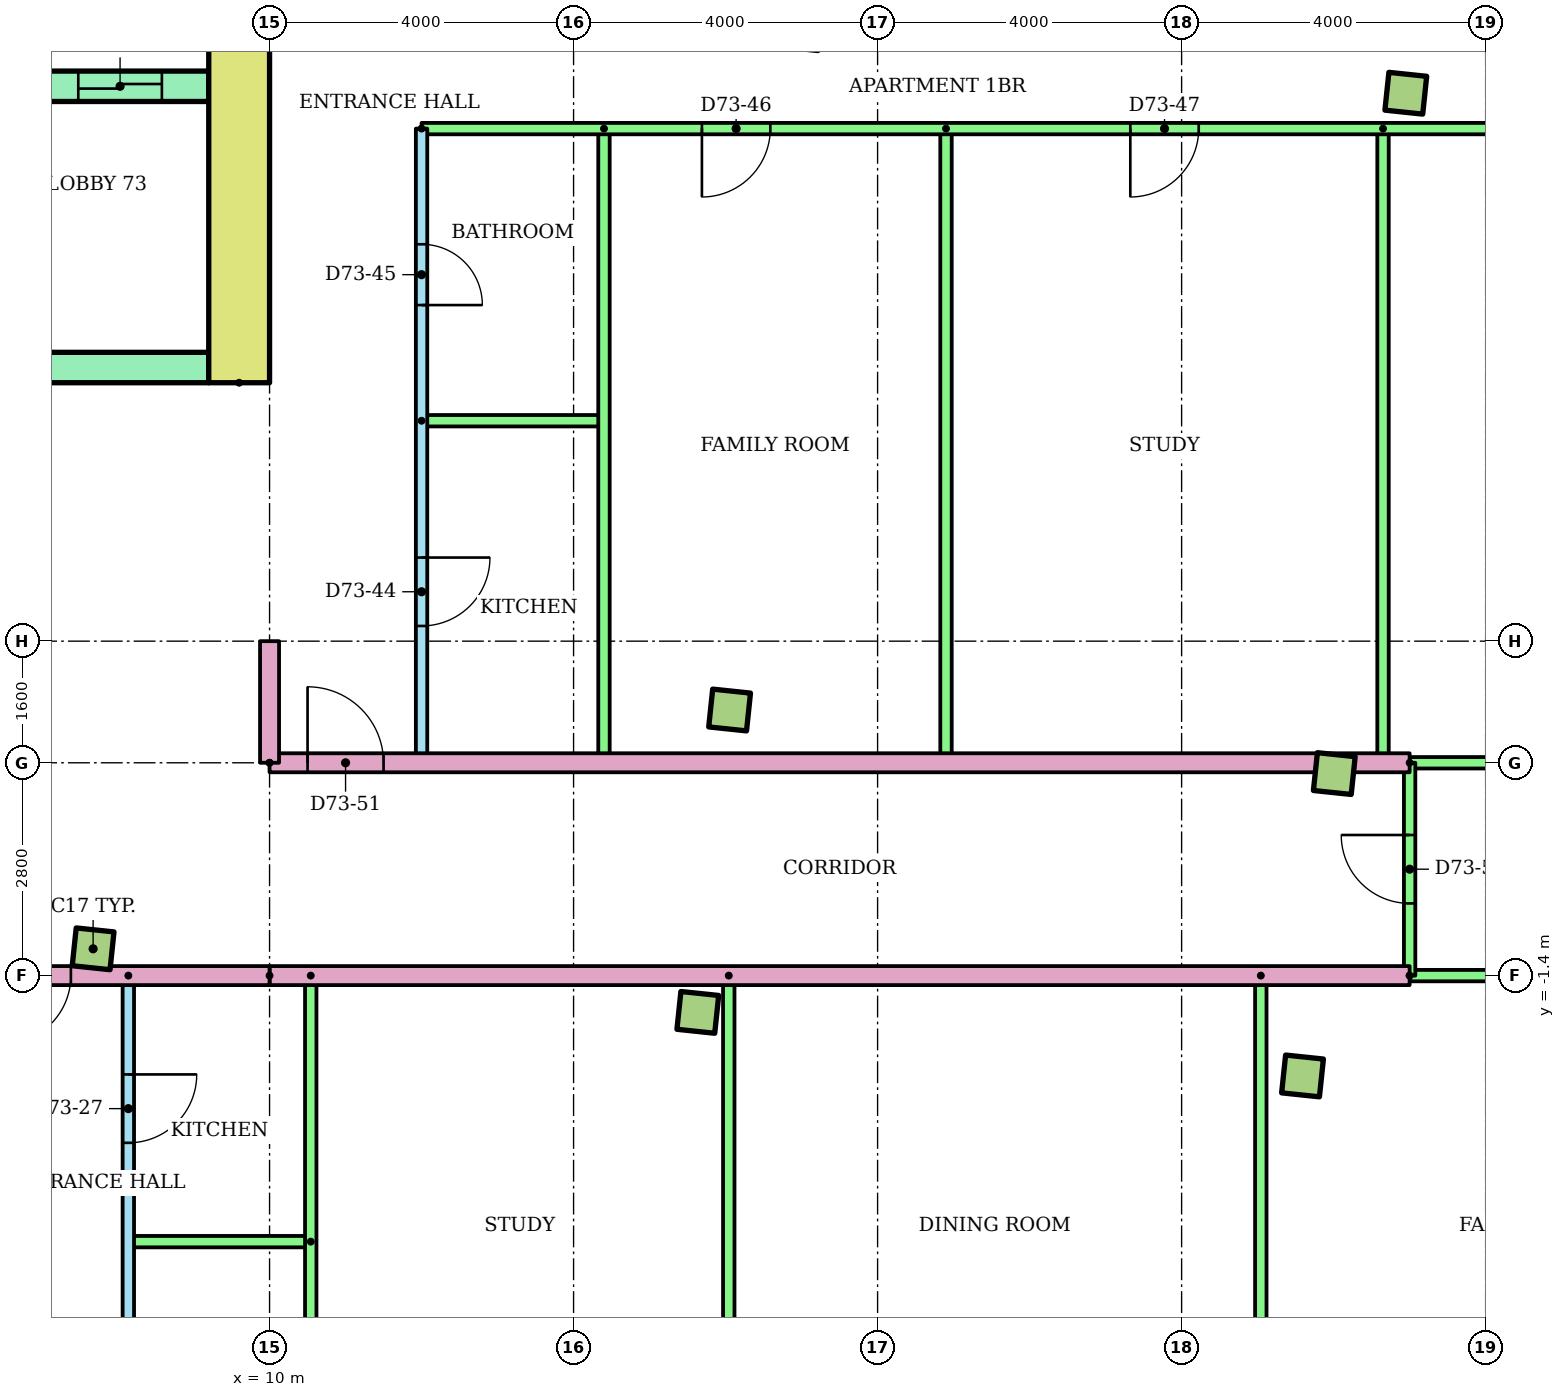
"""IFC4 building model, lengths in metres.
Left out: names, types, materials, properties, quantities, classifications, styles, units other than length and angle.
Written with IfcOpenShell. Run it as: python <this file> out.ifc"""

import sys

from ifc_helpers import new_model, si_unit, direction, frame, frame_2d, origin, origin_2d, place, context, subcontext, project, spatial, rectangle, extrude, element, fill, save


model = new_model("IFC4")
c1 = context("Model", 3, precision=1e-05, world=origin(), true_north=direction((0.0, 1.0)))
c2 = subcontext(c1, "Body", "Model", "MODEL_VIEW")
j1 = project(units=[si_unit("LENGTHUNIT", "METRE"), si_unit("PLANEANGLEUNIT", "RADIAN")], contexts=[c1])
p1 = place(None, origin())
s1 = spatial("IfcSite", under=j1, at=p1, CompositionType="ELEMENT")
p2 = place(p1, origin())
s2 = spatial("IfcBuilding", under=s1, at=p2, CompositionType="ELEMENT")
p3 = place(p2, frame((0.0, 0.0, 278.7)))
s3 = spatial("IfcBuildingStorey", under=s2, at=p3, CompositionType="ELEMENT", Elevation=278.7)
for number, where, z_axis, x_axis in (
    (1, (7.678, -1.048, 0.0), (0.0, 0.0, 1.0), (0.995, -0.105, 0.0)),
    (2, (15.635, -1.884, 0.0), (0.0, 0.0, 1.0), (0.995, -0.105, 0.0)),
    (3, (23.591, -2.72, 0.0), (0.0, 0.0, 1.0), (0.995, -0.105, 0.0)),
    (4, (16.053, 2.094, 0.0), (0.0, 0.0, 1.0), (0.995, -0.105, 0.0)),
    (5, (24.009, 1.258, 0.0), (0.0, 0.0, 1.0), (0.995, -0.105, 0.0)),
    (6, (24.95, 10.209, 0.0), (0.0, 0.0, 1.0), (0.995, -0.105, 0.0)),
):
    element("IfcColumn", number, at=place(p3, frame(where, z_axis=z_axis, x_axis=x_axis)), inside=s3, PredefinedType="COLUMN", context=c2, shape_type="SweptSolid", body=[
        extrude(rectangle(XDim=0.5, YDim=0.5, at=origin_2d()), origin(), (0.0, 0.0, 1.0), 3.2),
    ])
p4 = place(p3, frame((9.6, 6.4, 0.0), z_axis=(0.0, 0.0, 1.0), x_axis=(0.0, 1.0, 0.0)))
e7 = element("IfcWall", 7, at=p4, inside=s3, PredefinedType="SHEAR", context=c2, shape_type="SweptSolid", body=[
    extrude(rectangle(XDim=13.6, YDim=0.8, at=frame_2d((6.8, 0.0))), origin(), (0.0, 0.0, 1.0), 2.8),
])
p5 = place(p3, frame((-9.2, 6.6, 0.0)))
e8 = element("IfcWall", 8, at=p5, inside=s3, PredefinedType="SHEAR", context=c2, shape_type="SweptSolid", body=[
    extrude(rectangle(XDim=18.4, YDim=0.4, at=frame_2d((9.2, 0.0))), origin(), (0.0, 0.0, 1.0), 2.8),
])
p6 = place(p5, frame((8.3, 0.0, 0.0)))
e9 = element("IfcOpeningElement", 9, at=p6, cuts=e8, PredefinedType="OPENING", context=c2, shape_type="SweptSolid", body=[
    extrude(rectangle(XDim=1.8, YDim=2.1, at=frame_2d((0.9, 1.05))), frame((0.0, 0.21, 0.0), z_axis=(0.0, -1.0, 0.0), x_axis=(1.0, 0.0, 0.0)), (0.0, 0.0, 1.0), 0.42),
])
p7 = place(p5, frame((3.8, 0.0, 0.0)))
e10 = element("IfcOpeningElement", 10, at=p7, cuts=e8, PredefinedType="OPENING", context=c2, shape_type="SweptSolid", body=[
    extrude(rectangle(XDim=1.8, YDim=2.1, at=frame_2d((0.9, 1.05))), frame((0.0, 0.21, 0.0), z_axis=(0.0, -1.0, 0.0), x_axis=(1.0, 0.0, 0.0)), (0.0, 0.0, 1.0), 0.42),
])
p8 = place(p5, frame((12.8, 0.0, 0.0)))
e11 = element("IfcOpeningElement", 11, at=p8, cuts=e8, PredefinedType="OPENING", context=c2, shape_type="SweptSolid", body=[
    extrude(rectangle(XDim=1.8, YDim=2.1, at=frame_2d((0.9, 1.05))), frame((0.0, 0.21, 0.0), z_axis=(0.0, -1.0, 0.0), x_axis=(1.0, 0.0, 0.0)), (0.0, 0.0, 1.0), 0.42),
])
p9 = place(p3, frame((1.2, 10.3, 0.0)))
e12 = element("IfcWall", 12, at=p9, inside=s3, PredefinedType="SHEAR", context=c2, shape_type="SweptSolid", body=[
    extrude(rectangle(XDim=8.0, YDim=0.4, at=frame_2d((4.0, 0.0))), origin(), (0.0, 0.0, 1.0), 2.8),
])
p10 = place(p9, frame((0.817, 0.0, 0.0)))
e13 = element("IfcOpeningElement", 13, at=p10, cuts=e12, PredefinedType="OPENING", context=c2, shape_type="SweptSolid", body=[
    extrude(rectangle(XDim=1.1, YDim=2.1, at=frame_2d((0.55, 1.05))), frame((0.0, 0.21, 0.0), z_axis=(0.0, -1.0, 0.0), x_axis=(1.0, 0.0, 0.0)), (0.0, 0.0, 1.0), 0.42),
])
p11 = place(p9, frame((3.55, 0.0, 0.0)))
e14 = element("IfcOpeningElement", 14, at=p11, cuts=e12, PredefinedType="OPENING", context=c2, shape_type="SweptSolid", body=[
    extrude(rectangle(XDim=1.1, YDim=2.1, at=frame_2d((0.55, 1.05))), frame((0.0, 0.21, 0.0), z_axis=(0.0, -1.0, 0.0), x_axis=(1.0, 0.0, 0.0)), (0.0, 0.0, 1.0), 0.42),
])
p12 = place(p9, frame((6.283, 0.0, 0.0)))
e15 = element("IfcOpeningElement", 15, at=p12, cuts=e12, PredefinedType="OPENING", context=c2, shape_type="SweptSolid", body=[
    extrude(rectangle(XDim=1.1, YDim=2.1, at=frame_2d((0.55, 1.05))), frame((0.0, 0.21, 0.0), z_axis=(0.0, -1.0, 0.0), x_axis=(1.0, 0.0, 0.0)), (0.0, 0.0, 1.0), 0.42),
])
p13 = place(p3, frame((8.142, -1.4, 0.0), z_axis=(0.0, 0.0, 1.0), x_axis=(0.0, -1.0, 0.0)))
e16 = element("IfcWall", 16, at=p13, inside=s3, PredefinedType="PARTITIONING", context=c2, shape_type="SweptSolid", body=[
    extrude(rectangle(XDim=6.582, YDim=0.15, at=frame_2d((3.291, 0.0))), origin(), (0.0, 0.0, 1.0), 2.4),
])
p14 = place(p13, frame((1.3, 0.0, 0.0)))
e17 = element("IfcOpeningElement", 17, at=p14, cuts=e16, PredefinedType="OPENING", context=c2, shape_type="SweptSolid", body=[
    extrude(rectangle(XDim=0.9, YDim=2.1, at=frame_2d((0.45, 1.05))), frame((0.0, 0.085, 0.0), z_axis=(0.0, -1.0, 0.0), x_axis=(1.0, 0.0, 0.0)), (0.0, 0.0, 1.0), 0.17),
])
p15 = place(p13, frame((4.641, 0.0, 0.0)))
e18 = element("IfcOpeningElement", 18, at=p15, cuts=e16, PredefinedType="OPENING", context=c2, shape_type="SweptSolid", body=[
    extrude(rectangle(XDim=0.8, YDim=2.1, at=frame_2d((0.4, 1.05))), frame((0.0, 0.085, 0.0), z_axis=(0.0, -1.0, 0.0), x_axis=(1.0, 0.0, 0.0)), (0.0, 0.0, 1.0), 0.17),
])
p16 = place(p3, frame((10.542, -4.9, 0.0), z_axis=(0.0, 0.0, 1.0), x_axis=(-1.0, 0.0, 0.0)))
e19 = element("IfcWall", 19, at=p16, inside=s3, PredefinedType="PARTITIONING", context=c2, shape_type="SweptSolid", body=[
    extrude(rectangle(XDim=2.4, YDim=0.15, at=frame_2d((1.2, 0.0))), origin(), (0.0, 0.0, 1.0), 2.4),
])
for number, where, z_axis, x_axis in (
    (20, (10.542, -1.4, 0.0), (0.0, 0.0, 1.0), (0.0, -1.0, 0.0)),
    (21, (16.042, -1.4, 0.0), (0.0, 0.0, 1.0), (0.0, -1.0, 0.0)),
    (22, (23.042, -1.4, 0.0), (0.0, 0.0, 1.0), (0.0, -1.0, 0.0)),
):
    element("IfcWall", number, at=place(p3, frame(where, z_axis=z_axis, x_axis=x_axis)), inside=s3, PredefinedType="PARTITIONING", context=c2, shape_type="SweptSolid", body=[
        extrude(rectangle(XDim=6.582, YDim=0.15, at=frame_2d((3.291, 0.0))), origin(), (0.0, 0.0, 1.0), 2.4),
    ])
p17 = place(p3, frame((25.0, -1.4, 0.0), z_axis=(0.0, 0.0, 1.0), x_axis=(-1.0, 0.0, 0.0)))
e23 = element("IfcWall", 23, at=p17, inside=s3, PredefinedType="PARTITIONING", context=c2, shape_type="SweptSolid", body=[
    extrude(rectangle(XDim=15.0, YDim=0.25, at=frame_2d((7.5, 0.0))), origin(), (0.0, 0.0, 1.0), 2.4),
])
p18 = place(p3, frame((30.798, -1.4, 0.0), z_axis=(0.0, 0.0, 1.0), x_axis=(-1.0, 0.0, 0.0)))
e24 = element("IfcWall", 24, at=p18, inside=s3, PredefinedType="PARTITIONING", context=c2, shape_type="SweptSolid", body=[
    extrude(rectangle(XDim=5.798, YDim=0.15, at=frame_2d((2.899, 0.0))), origin(), (0.0, 0.0, 1.0), 2.4),
])
p19 = place(p3, frame((12.0, 9.743, 0.0), z_axis=(0.0, 0.0, 1.0), x_axis=(0.0, -1.0, 0.0)))
e25 = element("IfcWall", 25, at=p19, inside=s3, PredefinedType="PARTITIONING", context=c2, shape_type="SweptSolid", body=[
    extrude(rectangle(XDim=8.344, YDim=0.15, at=frame_2d((4.172, 0.0))), origin(), (0.0, 0.0, 1.0), 2.4),
])
p20 = place(p19, frame((5.643, 0.0, 0.0)))
e26 = element("IfcOpeningElement", 26, at=p20, cuts=e25, PredefinedType="OPENING", context=c2, shape_type="SweptSolid", body=[
    extrude(rectangle(XDim=0.9, YDim=2.1, at=frame_2d((0.45, 1.05))), frame((0.0, 0.085, 0.0), z_axis=(0.0, -1.0, 0.0), x_axis=(1.0, 0.0, 0.0)), (0.0, 0.0, 1.0), 0.17),
])
p21 = place(p19, frame((1.522, 0.0, 0.0)))
e27 = element("IfcOpeningElement", 27, at=p21, cuts=e25, PredefinedType="OPENING", context=c2, shape_type="SweptSolid", body=[
    extrude(rectangle(XDim=0.8, YDim=2.1, at=frame_2d((0.4, 1.05))), frame((0.0, 0.085, 0.0), z_axis=(0.0, -1.0, 0.0), x_axis=(1.0, 0.0, 0.0)), (0.0, 0.0, 1.0), 0.17),
])
p22 = place(p3, frame((12.0, 5.9, 0.0)))
e28 = element("IfcWall", 28, at=p22, inside=s3, PredefinedType="PARTITIONING", context=c2, shape_type="SweptSolid", body=[
    extrude(rectangle(XDim=2.4, YDim=0.15, at=frame_2d((1.2, 0.0))), origin(), (0.0, 0.0, 1.0), 2.4),
])
for number, where, z_axis, x_axis in (
    (29, (14.4, 9.743, 0.0), (0.0, 0.0, 1.0), (0.0, -1.0, 0.0)),
    (30, (18.9, 9.743, 0.0), (0.0, 0.0, 1.0), (0.0, -1.0, 0.0)),
    (31, (24.65, 9.743, 0.0), (0.0, 0.0, 1.0), (0.0, -1.0, 0.0)),
):
    element("IfcWall", number, at=place(p3, frame(where, z_axis=z_axis, x_axis=x_axis)), inside=s3, PredefinedType="PARTITIONING", context=c2, shape_type="SweptSolid", body=[
        extrude(rectangle(XDim=8.344, YDim=0.15, at=frame_2d((4.172, 0.0))), origin(), (0.0, 0.0, 1.0), 2.4),
    ])
p23 = place(p3, frame((31.96, 9.743, 0.0), z_axis=(0.0, 0.0, 1.0), x_axis=(-1.0, 0.0, 0.0)))
e32 = element("IfcWall", 32, at=p23, inside=s3, PredefinedType="PARTITIONING", context=c2, shape_type="SweptSolid", body=[
    extrude(rectangle(XDim=19.96, YDim=0.15, at=frame_2d((9.98, 0.0))), origin(), (0.0, 0.0, 1.0), 2.4),
])
p24 = place(p23, frame((15.372, 0.0, 0.0)))
e33 = element("IfcOpeningElement", 33, at=p24, cuts=e32, PredefinedType="OPENING", context=c2, shape_type="SweptSolid", body=[
    extrude(rectangle(XDim=0.9, YDim=2.1, at=frame_2d((0.45, 1.05))), frame((0.0, 0.085, 0.0), z_axis=(0.0, -1.0, 0.0), x_axis=(1.0, 0.0, 0.0)), (0.0, 0.0, 1.0), 0.17),
])
p25 = place(p23, frame((9.735, 0.0, 0.0)))
e34 = element("IfcOpeningElement", 34, at=p25, cuts=e32, PredefinedType="OPENING", context=c2, shape_type="SweptSolid", body=[
    extrude(rectangle(XDim=0.9, YDim=2.1, at=frame_2d((0.45, 1.05))), frame((0.0, 0.085, 0.0), z_axis=(0.0, -1.0, 0.0), x_axis=(1.0, 0.0, 0.0)), (0.0, 0.0, 1.0), 0.17),
])
p26 = place(p23, frame((3.157, 0.0, 0.0)))
e35 = element("IfcOpeningElement", 35, at=p26, cuts=e32, PredefinedType="OPENING", context=c2, shape_type="SweptSolid", body=[
    extrude(rectangle(XDim=0.9, YDim=2.1, at=frame_2d((0.45, 1.05))), frame((0.0, 0.085, 0.0), z_axis=(0.0, -1.0, 0.0), x_axis=(1.0, 0.0, 0.0)), (0.0, 0.0, 1.0), 0.17),
])
p27 = place(p3, frame((10.0, 1.4, 0.0)))
e36 = element("IfcWall", 36, at=p27, inside=s3, PredefinedType="PARTITIONING", context=c2, shape_type="SweptSolid", body=[
    extrude(rectangle(XDim=15.0, YDim=0.25, at=frame_2d((7.5, 0.0))), origin(), (0.0, 0.0, 1.0), 2.4),
])
p28 = place(p27, frame((0.5, 0.0, 0.0)))
e37 = element("IfcOpeningElement", 37, at=p28, cuts=e36, PredefinedType="OPENING", context=c2, shape_type="SweptSolid", body=[
    extrude(rectangle(XDim=1.0, YDim=2.1, at=frame_2d((0.5, 1.05))), frame((0.0, 0.135, 0.0), z_axis=(0.0, -1.0, 0.0), x_axis=(1.0, 0.0, 0.0)), (0.0, 0.0, 1.0), 0.27),
])
p29 = place(p3, frame((25.0, 1.4, 0.0)))
e38 = element("IfcWall", 38, at=p29, inside=s3, PredefinedType="PARTITIONING", context=c2, shape_type="SweptSolid", body=[
    extrude(rectangle(XDim=6.093, YDim=0.15, at=frame_2d((3.046, 0.0))), origin(), (0.0, 0.0, 1.0), 2.4),
])
p30 = place(p3, frame((25.0, -1.4, 0.0), z_axis=(0.0, 0.0, 1.0), x_axis=(0.0, 1.0, 0.0)))
e39 = element("IfcWall", 39, at=p30, inside=s3, PredefinedType="PARTITIONING", context=c2, shape_type="SweptSolid", body=[
    extrude(rectangle(XDim=2.8, YDim=0.15, at=frame_2d((1.4, 0.0))), origin(), (0.0, 0.0, 1.0), 2.4),
])
p31 = place(p30, frame((0.95, 0.0, 0.0)))
e40 = element("IfcOpeningElement", 40, at=p31, cuts=e39, PredefinedType="OPENING", context=c2, shape_type="SweptSolid", body=[
    extrude(rectangle(XDim=0.9, YDim=2.1, at=frame_2d((0.45, 1.05))), frame((0.0, 0.085, 0.0), z_axis=(0.0, -1.0, 0.0), x_axis=(1.0, 0.0, 0.0)), (0.0, 0.0, 1.0), 0.17),
])
p32 = place(p3, frame((10.0, -1.4, 0.0), z_axis=(0.0, 0.0, 1.0), x_axis=(-1.0, 0.0, 0.0)))
e41 = element("IfcWall", 41, at=p32, inside=s3, PredefinedType="PARTITIONING", context=c2, shape_type="SweptSolid", body=[
    extrude(rectangle(XDim=20.0, YDim=0.25, at=frame_2d((10.0, 0.0))), origin(), (0.0, 0.0, 1.0), 2.4),
])
p33 = place(p32, frame((4.358, 0.0, 0.0)))
e42 = element("IfcOpeningElement", 42, at=p33, cuts=e41, PredefinedType="OPENING", context=c2, shape_type="SweptSolid", body=[
    extrude(rectangle(XDim=1.0, YDim=2.1, at=frame_2d((0.5, 1.05))), frame((0.0, 0.135, 0.0), z_axis=(0.0, -1.0, 0.0), x_axis=(1.0, 0.0, 0.0)), (0.0, 0.0, 1.0), 0.27),
])
p34 = place(p32, frame((2.614, 0.0, 0.0)))
e43 = element("IfcOpeningElement", 43, at=p34, cuts=e41, PredefinedType="OPENING", context=c2, shape_type="SweptSolid", body=[
    extrude(rectangle(XDim=0.9, YDim=2.1, at=frame_2d((0.45, 1.05))), frame((0.0, 0.135, 0.0), z_axis=(0.0, -1.0, 0.0), x_axis=(1.0, 0.0, 0.0)), (0.0, 0.0, 1.0), 0.27),
])
p35 = place(p3, frame((10.0, 1.4, 0.0), z_axis=(0.0, 0.0, 1.0), x_axis=(0.0, 1.0, 0.0)))
e44 = element("IfcWall", 44, at=p35, inside=s3, PredefinedType="PARTITIONING", context=c2, shape_type="SweptSolid", body=[
    extrude(rectangle(XDim=1.6, YDim=0.25, at=frame_2d((0.8, 0.0))), origin(), (0.0, 0.0, 1.0), 2.4),
])
p36 = place(p12, origin())
e45 = element("IfcDoor", 45, at=p36, inside=s3, OperationType="SLIDING_TO_LEFT", PredefinedType="DOOR", context=c2, shape_type="SweptSolid", body=[
    extrude(rectangle(XDim=1.1, YDim=2.1, at=frame_2d((0.55, 1.05))), frame((0.0, 0.025, 0.0), z_axis=(0.0, -1.0, 0.0), x_axis=(1.0, 0.0, 0.0)), (0.0, 0.0, 1.0), 0.05),
])
fill(e15, e45)
p37 = place(p14, origin())
e46 = element("IfcDoor", 46, at=p37, inside=s3, OperationType="SINGLE_SWING_LEFT", PredefinedType="DOOR", context=c2, shape_type="SweptSolid", body=[
    extrude(rectangle(XDim=0.9, YDim=2.1, at=frame_2d((0.45, 1.05))), frame((0.0, 0.025, 0.0), z_axis=(0.0, -1.0, 0.0), x_axis=(1.0, 0.0, 0.0)), (0.0, 0.0, 1.0), 0.05),
])
fill(e17, e46)
p38 = place(p34, origin())
e47 = element("IfcDoor", 47, at=p38, inside=s3, OperationType="SINGLE_SWING_RIGHT", PredefinedType="DOOR", context=c2, shape_type="SweptSolid", body=[
    extrude(rectangle(XDim=0.9, YDim=2.1, at=frame_2d((0.45, 1.05))), frame((0.0, 0.025, 0.0), z_axis=(0.0, -1.0, 0.0), x_axis=(1.0, 0.0, 0.0)), (0.0, 0.0, 1.0), 0.05),
])
fill(e43, e47)
p39 = place(p20, origin())
e48 = element("IfcDoor", 48, at=p39, inside=s3, OperationType="SINGLE_SWING_LEFT", PredefinedType="DOOR", context=c2, shape_type="SweptSolid", body=[
    extrude(rectangle(XDim=0.9, YDim=2.1, at=frame_2d((0.45, 1.05))), frame((0.0, 0.025, 0.0), z_axis=(0.0, -1.0, 0.0), x_axis=(1.0, 0.0, 0.0)), (0.0, 0.0, 1.0), 0.05),
])
fill(e26, e48)
p40 = place(p21, origin())
e49 = element("IfcDoor", 49, at=p40, inside=s3, OperationType="SINGLE_SWING_RIGHT", PredefinedType="DOOR", context=c2, shape_type="SweptSolid", body=[
    extrude(rectangle(XDim=0.8, YDim=2.1, at=frame_2d((0.4, 1.05))), frame((0.0, 0.025, 0.0), z_axis=(0.0, -1.0, 0.0), x_axis=(1.0, 0.0, 0.0)), (0.0, 0.0, 1.0), 0.05),
])
fill(e27, e49)
p41 = place(p24, origin())
e50 = element("IfcDoor", 50, at=p41, inside=s3, OperationType="SINGLE_SWING_RIGHT", PredefinedType="DOOR", context=c2, shape_type="SweptSolid", body=[
    extrude(rectangle(XDim=0.9, YDim=2.1, at=frame_2d((0.45, 1.05))), frame((0.0, 0.025, 0.0), z_axis=(0.0, -1.0, 0.0), x_axis=(1.0, 0.0, 0.0)), (0.0, 0.0, 1.0), 0.05),
])
fill(e33, e50)
p42 = place(p25, origin())
e51 = element("IfcDoor", 51, at=p42, inside=s3, OperationType="SINGLE_SWING_RIGHT", PredefinedType="DOOR", context=c2, shape_type="SweptSolid", body=[
    extrude(rectangle(XDim=0.9, YDim=2.1, at=frame_2d((0.45, 1.05))), frame((0.0, 0.025, 0.0), z_axis=(0.0, -1.0, 0.0), x_axis=(1.0, 0.0, 0.0)), (0.0, 0.0, 1.0), 0.05),
])
fill(e34, e51)
p43 = place(p28, origin())
e52 = element("IfcDoor", 52, at=p43, inside=s3, OperationType="SINGLE_SWING_LEFT", PredefinedType="DOOR", context=c2, shape_type="SweptSolid", body=[
    extrude(rectangle(XDim=1.0, YDim=2.1, at=frame_2d((0.5, 1.05))), frame((0.0, 0.025, 0.0), z_axis=(0.0, -1.0, 0.0), x_axis=(1.0, 0.0, 0.0)), (0.0, 0.0, 1.0), 0.05),
])
fill(e37, e52)
p44 = place(p31, origin())
e53 = element("IfcDoor", 53, at=p44, inside=s3, OperationType="SINGLE_SWING_RIGHT", PredefinedType="DOOR", context=c2, shape_type="SweptSolid", body=[
    extrude(rectangle(XDim=0.9, YDim=2.1, at=frame_2d((0.45, 1.05))), frame((0.0, 0.025, 0.0), z_axis=(0.0, -1.0, 0.0), x_axis=(1.0, 0.0, 0.0)), (0.0, 0.0, 1.0), 0.05),
])
fill(e40, e53)
save(model, sys.argv[1])
